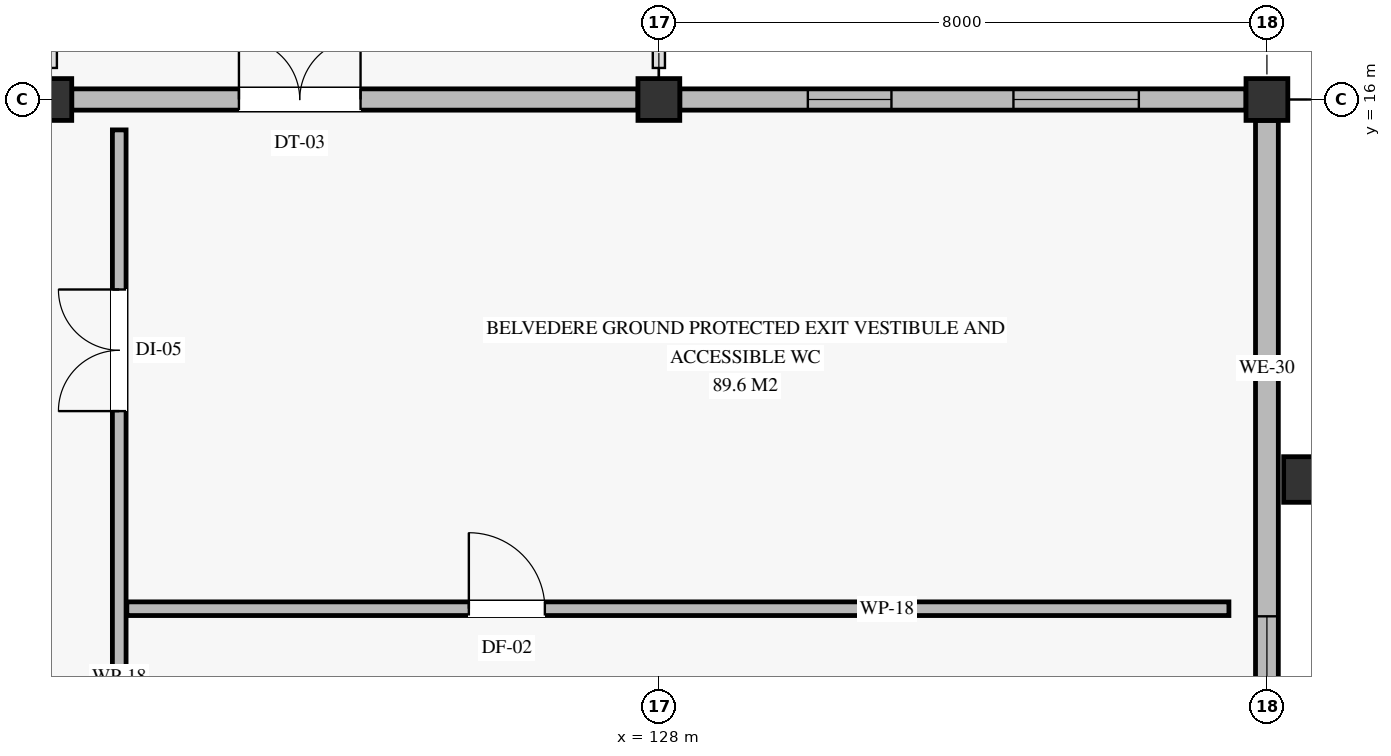
"""IFC4 building model, lengths in metres.
Left out: names, types, materials, properties, quantities, classifications, styles, units other than length and angle.
Written with IfcOpenShell. Run it as: python <this file> out.ifc"""

import sys

from ifc_helpers import new_model, si_unit, direction, frame, frame_2d, origin, origin_2d, place, context, subcontext, project, spatial, rectangle, extrude, element, fill, save


model = new_model("IFC4")
c1 = context("Model", 3, precision=1e-05, world=origin(), true_north=direction((0.0, 1.0)))
c2 = subcontext(c1, "Body", "Model", "MODEL_VIEW")
j1 = project(units=[si_unit("LENGTHUNIT", "METRE"), si_unit("PLANEANGLEUNIT", "RADIAN")], contexts=[c1])
p1 = place(None, origin())
s1 = spatial("IfcSite", under=j1, at=p1, CompositionType="ELEMENT")
p2 = place(p1, origin())
s2 = spatial("IfcBuilding", under=s1, at=p2, CompositionType="ELEMENT")
p3 = place(p2, origin())
s3 = spatial("IfcBuildingStorey", under=s2, at=p3, CompositionType="ELEMENT", Elevation=0.0)
for number, where, z_axis, x_axis in (
    (1, (120.0, 16.0, 0.0), (0.0, 0.0, 1.0), (1.0, 0.0, 0.0)),
    (2, (128.0, 16.0, 0.0), (0.0, 0.0, 1.0), (1.0, 0.0, 0.0)),
    (3, (136.0, 16.0, 0.0), (0.0, 0.0, 1.0), (1.0, 0.0, 0.0)),
):
    element("IfcColumn", number, at=place(p3, frame(where, z_axis=z_axis, x_axis=x_axis)), inside=s3, PredefinedType="COLUMN", context=c2, shape_type="SweptSolid", body=[
        extrude(rectangle(XDim=0.55, YDim=0.55, at=origin_2d()), origin(), (0.0, 0.0, 1.0), 4.8),
    ])
p4 = place(p3, frame((136.42, 11.0, 0.0), z_axis=(0.0, 0.0, 1.0), x_axis=(1.0, 0.0, 0.0)))
e4 = element("IfcColumn", 4, at=p4, inside=s3, PredefinedType="PILASTER", context=c2, shape_type="SweptSolid", body=[
    extrude(rectangle(XDim=0.4, YDim=0.6, at=origin_2d()), origin(), (0.0, 0.0, 1.0), 4.8),
])
p5 = place(p3, frame((120.275, 16.0, 0.0), z_axis=(0.0, 0.0, 1.0), x_axis=(1.0, 0.0, 0.0)))
e5 = element("IfcWall", 5, at=p5, inside=s3, PredefinedType="STANDARD", context=c2, shape_type="SweptSolid", body=[
    extrude(rectangle(XDim=7.45, YDim=0.28, at=frame_2d((3.725, 0.0))), origin(), (0.0, 0.0, 1.0), 3.89),
])
p6 = place(p5, frame((2.2, 0.0, 0.0)))
e6 = element("IfcOpeningElement", 6, at=p6, cuts=e5, PredefinedType="OPENING", context=c2, shape_type="SweptSolid", body=[
    extrude(rectangle(XDim=1.6, YDim=2.4, at=frame_2d((0.8, 1.2))), frame((0.0, 0.15, 0.0), z_axis=(0.0, -1.0, 0.0), x_axis=(1.0, 0.0, 0.0)), (0.0, 0.0, 1.0), 0.3),
])
p7 = place(p3, frame((128.275, 16.0, 0.0), z_axis=(0.0, 0.0, 1.0), x_axis=(1.0, 0.0, 0.0)))
e7 = element("IfcWall", 7, at=p7, inside=s3, PredefinedType="STANDARD", context=c2, shape_type="SweptSolid", body=[
    extrude(rectangle(XDim=7.45, YDim=0.28, at=frame_2d((3.725, 0.0))), origin(), (0.0, 0.0, 1.0), 3.89),
])
p8 = place(p7, frame((1.685, 0.0, 0.78)))
e8 = element("IfcOpeningElement", 8, at=p8, cuts=e7, PredefinedType="OPENING", context=c2, shape_type="SweptSolid", body=[
    extrude(rectangle(XDim=1.1, YDim=2.2, at=frame_2d((0.55, 1.1))), frame((0.0, 0.15, 0.0), z_axis=(0.0, -1.0, 0.0), x_axis=(1.0, 0.0, 0.0)), (0.0, 0.0, 1.0), 0.3),
])
p9 = place(p7, frame((4.39, 0.0, 0.78)))
e9 = element("IfcOpeningElement", 9, at=p9, cuts=e7, PredefinedType="OPENING", context=c2, shape_type="SweptSolid", body=[
    extrude(rectangle(XDim=1.65, YDim=2.4, at=frame_2d((0.825, 1.2))), frame((0.0, 0.15, 0.0), z_axis=(0.0, -1.0, 0.0), x_axis=(1.0, 0.0, 0.0)), (0.0, 0.0, 1.0), 0.3),
])
p10 = place(p3, frame((136.0, 15.725, 0.0), z_axis=(0.0, 0.0, 1.0), x_axis=(0.0, -1.0, 0.0)))
e10 = element("IfcWall", 10, at=p10, inside=s3, PredefinedType="STANDARD", context=c2, shape_type="SweptSolid", body=[
    extrude(rectangle(XDim=15.45, YDim=0.3, at=frame_2d((7.725, 0.0))), origin(), (0.0, 0.0, 1.0), 2.89),
])
p11 = place(p10, frame((6.525, 0.0, 0.75)))
e11 = element("IfcOpeningElement", 11, at=p11, cuts=e10, PredefinedType="OPENING", context=c2, shape_type="SweptSolid", body=[
    extrude(rectangle(XDim=2.4, YDim=1.6, at=frame_2d((1.2, 0.8))), frame((0.0, 0.16, 0.0), z_axis=(0.0, -1.0, 0.0), x_axis=(1.0, 0.0, 0.0)), (0.0, 0.0, 1.0), 0.32),
])
p12 = place(p3, frame((120.9, 0.4, 0.0), z_axis=(0.0, 0.0, 1.0), x_axis=(0.0, 1.0, 0.0)))
e12 = element("IfcWall", 12, at=p12, inside=s3, PredefinedType="PARTITIONING", context=c2, shape_type="SweptSolid", body=[
    extrude(rectangle(XDim=15.2, YDim=0.18, at=frame_2d((7.6, 0.0))), origin(), (0.0, 0.0, 1.0), 3.882),
])
p13 = place(p12, frame((3.5, 0.0, 0.0)))
e13 = element("IfcOpeningElement", 13, at=p13, cuts=e12, PredefinedType="OPENING", context=c2, shape_type="SweptSolid", body=[
    extrude(rectangle(XDim=1.0, YDim=2.15, at=frame_2d((0.5, 1.075))), frame((0.0, 0.1, 0.0), z_axis=(0.0, -1.0, 0.0), x_axis=(1.0, 0.0, 0.0)), (0.0, 0.0, 1.0), 0.2),
])
p14 = place(p12, frame((11.5, 0.0, 0.0)))
e14 = element("IfcOpeningElement", 14, at=p14, cuts=e12, PredefinedType="OPENING", context=c2, shape_type="SweptSolid", body=[
    extrude(rectangle(XDim=1.6, YDim=2.3, at=frame_2d((0.8, 1.15))), frame((0.0, 0.1, 0.0), z_axis=(0.0, -1.0, 0.0), x_axis=(1.0, 0.0, 0.0)), (0.0, 0.0, 1.0), 0.2),
])
p15 = place(p3, frame((121.0, 9.3, 0.0), z_axis=(0.0, 0.0, 1.0), x_axis=(1.0, 0.0, 0.0)))
e15 = element("IfcWall", 15, at=p15, inside=s3, PredefinedType="PARTITIONING", context=c2, shape_type="SweptSolid", body=[
    extrude(rectangle(XDim=14.5, YDim=0.18, at=frame_2d((7.25, 0.0))), origin(), (0.0, 0.0, 1.0), 2.882),
])
p16 = place(p15, frame((4.5, 0.0, 0.0)))
e16 = element("IfcOpeningElement", 16, at=p16, cuts=e15, PredefinedType="OPENING", context=c2, shape_type="SweptSolid", body=[
    extrude(rectangle(XDim=1.0, YDim=2.15, at=frame_2d((0.5, 1.075))), frame((0.0, 0.1, 0.0), z_axis=(0.0, -1.0, 0.0), x_axis=(1.0, 0.0, 0.0)), (0.0, 0.0, 1.0), 0.2),
])
p17 = place(p6, origin())
e17 = element("IfcDoor", 17, at=p17, inside=s3, OperationType="DOUBLE_DOOR_SINGLE_SWING", PredefinedType="DOOR", context=c2, shape_type="SweptSolid", body=[
    extrude(rectangle(XDim=1.6, YDim=2.4, at=frame_2d((0.8, 1.2))), frame((0.0, 0.025, 0.0), z_axis=(0.0, -1.0, 0.0), x_axis=(1.0, 0.0, 0.0)), (0.0, 0.0, 1.0), 0.05),
])
fill(e6, e17)
p18 = place(p8, origin())
e18 = element("IfcWindow", 18, at=p18, inside=s3, PartitioningType="SINGLE_PANEL", PredefinedType="WINDOW", context=c2, shape_type="SweptSolid", body=[
    extrude(rectangle(XDim=1.1, YDim=2.2, at=frame_2d((0.55, 1.1))), frame((0.0, 0.03, 0.0), z_axis=(0.0, -1.0, 0.0), x_axis=(1.0, 0.0, 0.0)), (0.0, 0.0, 1.0), 0.06),
])
fill(e8, e18)
p19 = place(p9, origin())
e19 = element("IfcWindow", 19, at=p19, inside=s3, PartitioningType="SINGLE_PANEL", PredefinedType="WINDOW", context=c2, shape_type="SweptSolid", body=[
    extrude(rectangle(XDim=1.65, YDim=2.4, at=frame_2d((0.825, 1.2))), frame((0.0, 0.03, 0.0), z_axis=(0.0, -1.0, 0.0), x_axis=(1.0, 0.0, 0.0)), (0.0, 0.0, 1.0), 0.06),
])
fill(e9, e19)
p20 = place(p11, origin())
e20 = element("IfcWindow", 20, at=p20, inside=s3, PartitioningType="SINGLE_PANEL", PredefinedType="WINDOW", context=c2, shape_type="SweptSolid", body=[
    extrude(rectangle(XDim=2.4, YDim=1.6, at=frame_2d((1.2, 0.8))), frame((0.0, 0.03, 0.0), z_axis=(0.0, -1.0, 0.0), x_axis=(1.0, 0.0, 0.0)), (0.0, 0.0, 1.0), 0.06),
])
fill(e11, e20)
p21 = place(p14, origin())
e21 = element("IfcDoor", 21, at=p21, inside=s3, OperationType="DOUBLE_DOOR_SINGLE_SWING", PredefinedType="DOOR", context=c2, shape_type="SweptSolid", body=[
    extrude(rectangle(XDim=1.6, YDim=2.3, at=frame_2d((0.8, 1.15))), frame((0.0, 0.025, 0.0), z_axis=(0.0, -1.0, 0.0), x_axis=(1.0, 0.0, 0.0)), (0.0, 0.0, 1.0), 0.05),
])
fill(e14, e21)
p22 = place(p16, origin())
e22 = element("IfcDoor", 22, at=p22, inside=s3, OperationType="SINGLE_SWING_LEFT", PredefinedType="DOOR", context=c2, shape_type="SweptSolid", body=[
    extrude(rectangle(XDim=1.0, YDim=2.15, at=frame_2d((0.5, 1.075))), frame((0.0, 0.025, 0.0), z_axis=(0.0, -1.0, 0.0), x_axis=(1.0, 0.0, 0.0)), (0.0, 0.0, 1.0), 0.05),
])
fill(e16, e22)
save(model, sys.argv[1])
